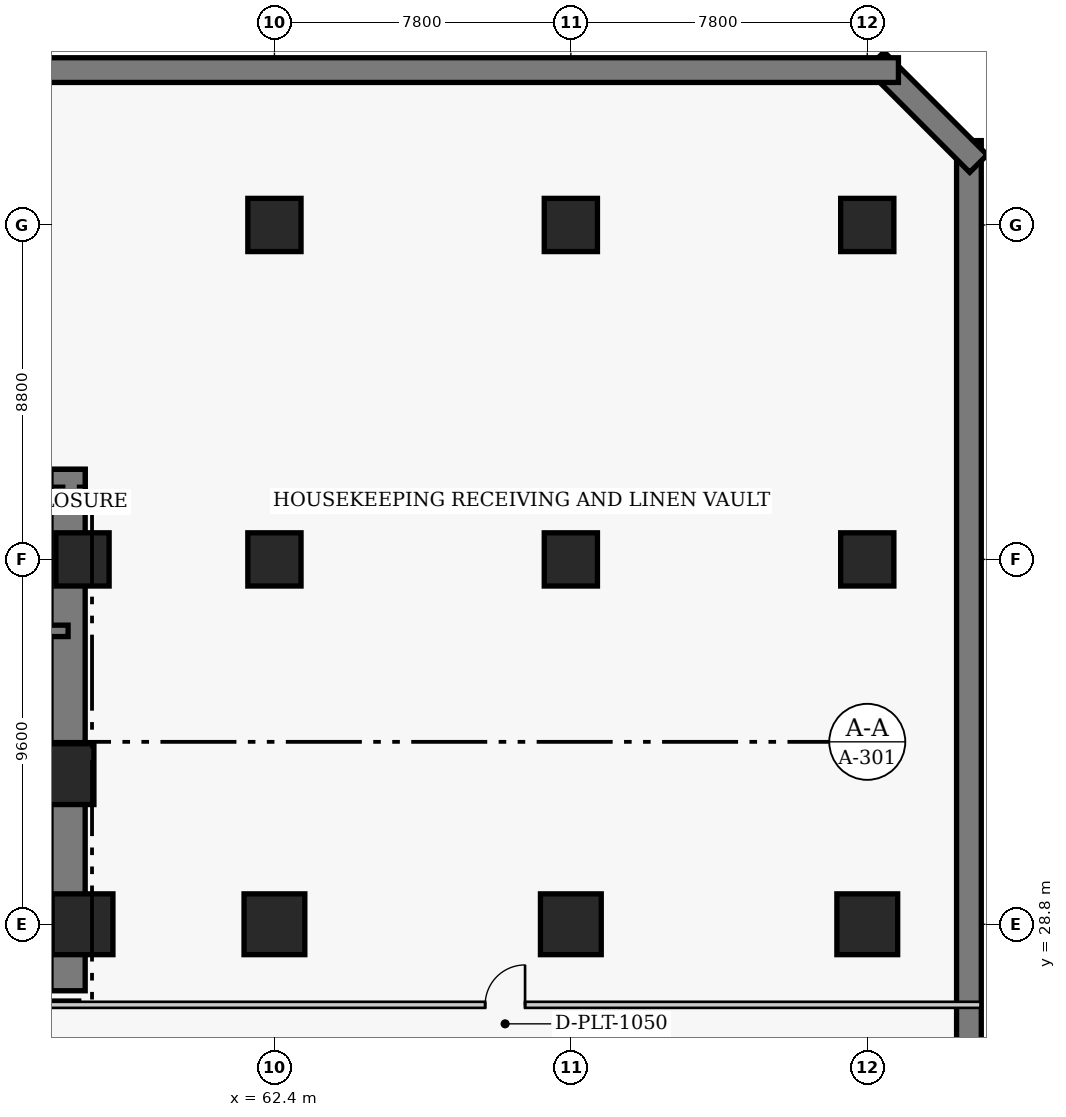
"""IFC4 building model, lengths in metres.
Left out: names, types, materials, properties, quantities, classifications, styles, units other than length and angle.
Written with IfcOpenShell. Run it as: python <this file> out.ifc"""

import sys

from ifc_helpers import new_model, si_unit, direction, frame, frame_2d, origin, origin_2d, place, context, subcontext, project, spatial, rectangle, extrude, element, fill, save


model = new_model("IFC4")
c1 = context("Model", 3, precision=1e-05, world=origin(), true_north=direction((0.0, 1.0)))
c2 = subcontext(c1, "Body", "Model", "MODEL_VIEW")
j1 = project(units=[si_unit("LENGTHUNIT", "METRE"), si_unit("PLANEANGLEUNIT", "RADIAN")], contexts=[c1])
p1 = place(None, origin())
s1 = spatial("IfcSite", under=j1, at=p1, CompositionType="ELEMENT")
p2 = place(p1, origin())
s2 = spatial("IfcBuilding", under=s1, at=p2, CompositionType="ELEMENT")
p3 = place(p2, frame((0.0, 0.0, -4.5)))
s3 = spatial("IfcBuildingStorey", under=s2, at=p3, CompositionType="ELEMENT", Elevation=-4.5)
p4 = place(p3, frame((80.675, 2.58, 0.0), z_axis=(0.0, 0.0, 1.0), x_axis=(0.0, 1.0, 0.0)))
e1 = element("IfcWall", 1, at=p4, inside=s3, PredefinedType="USERDEFINED", context=c2, shape_type="SweptSolid", body=[
    extrude(rectangle(XDim=46.84, YDim=0.65, at=frame_2d((23.42, 0.0))), origin(), (0.0, 0.0, 1.0), 4.15),
])
p5 = place(p3, frame((80.926, 48.815, 0.0), z_axis=(0.0, 0.0, 1.0), x_axis=(-0.707106781187, 0.707106781187, 0.0)))
e2 = element("IfcWall", 2, at=p5, inside=s3, PredefinedType="USERDEFINED", context=c2, shape_type="SweptSolid", body=[
    extrude(rectangle(XDim=3.834, YDim=0.65, at=frame_2d((1.917, 0.0))), origin(), (0.0, 0.0, 1.0), 4.15),
])
p6 = place(p3, frame((78.82, 51.275, 0.0), z_axis=(0.0, 0.0, 1.0), x_axis=(-1.0, 0.0, 0.0)))
e3 = element("IfcWall", 3, at=p6, inside=s3, PredefinedType="USERDEFINED", context=c2, shape_type="SweptSolid", body=[
    extrude(rectangle(XDim=79.64, YDim=0.65, at=frame_2d((39.82, 0.0))), origin(), (0.0, 0.0, 1.0), 4.15),
])
p7 = place(p3, frame((48.45, 40.32, 0.0), z_axis=(0.0, 0.0, 1.0), x_axis=(1.0, 0.0, 0.0)))
e4 = element("IfcWall", 4, at=p7, inside=s3, PredefinedType="SHEAR", context=c2, shape_type="SweptSolid", body=[
    extrude(rectangle(XDim=8.97, YDim=0.9, at=frame_2d((4.485, 0.0))), origin(), (0.0, 0.0, 1.0), 4.5),
])
p8 = place(p3, frame((56.97, 27.05, 0.0), z_axis=(0.0, 0.0, 1.0), x_axis=(0.0, 1.0, 0.0)))
e5 = element("IfcWall", 5, at=p8, inside=s3, PredefinedType="SHEAR", context=c2, shape_type="SweptSolid", body=[
    extrude(rectangle(XDim=13.72, YDim=0.9, at=frame_2d((6.86, 0.0))), origin(), (0.0, 0.0, 1.0), 4.5),
])
p9 = place(p3, frame((48.45, 36.52, 0.0), z_axis=(0.0, 0.0, 1.0), x_axis=(1.0, 0.0, 0.0)))
e6 = element("IfcWall", 6, at=p9, inside=s3, PredefinedType="SHEAR", context=c2, shape_type="SweptSolid", body=[
    extrude(rectangle(XDim=8.52, YDim=0.3, at=frame_2d((4.26, 0.0))), origin(), (0.0, 0.0, 1.0), 4.5),
])
p10 = place(p3, frame((62.4, 28.8, 0.0), z_axis=(0.0, 0.0, 1.0), x_axis=(1.0, 0.0, 0.0)))
e7 = element("IfcColumn", 7, at=p10, inside=s3, PredefinedType="COLUMN", context=c2, shape_type="SweptSolid", body=[
    extrude(rectangle(XDim=1.6, YDim=1.6, at=origin_2d()), origin(), (0.0, 0.0, 1.0), 4.5),
])
for number, where, z_axis, x_axis in (
    (8, (62.4, 38.4, 0.0), (0.0, 0.0, 1.0), (1.0, 0.0, 0.0)),
    (9, (62.4, 47.2, 0.0), (0.0, 0.0, 1.0), (1.0, 0.0, 0.0)),
):
    element("IfcColumn", number, at=place(p3, frame(where, z_axis=z_axis, x_axis=x_axis)), inside=s3, PredefinedType="COLUMN", context=c2, shape_type="SweptSolid", body=[
        extrude(rectangle(XDim=1.4, YDim=1.4, at=origin_2d()), origin(), (0.0, 0.0, 1.0), 4.5),
    ])
p11 = place(p3, frame((70.2, 28.8, 0.0), z_axis=(0.0, 0.0, 1.0), x_axis=(1.0, 0.0, 0.0)))
e10 = element("IfcColumn", 10, at=p11, inside=s3, PredefinedType="COLUMN", context=c2, shape_type="SweptSolid", body=[
    extrude(rectangle(XDim=1.6, YDim=1.6, at=origin_2d()), origin(), (0.0, 0.0, 1.0), 4.5),
])
for number, where, z_axis, x_axis in (
    (11, (70.2, 38.4, 0.0), (0.0, 0.0, 1.0), (1.0, 0.0, 0.0)),
    (12, (70.2, 47.2, 0.0), (0.0, 0.0, 1.0), (1.0, 0.0, 0.0)),
):
    element("IfcColumn", number, at=place(p3, frame(where, z_axis=z_axis, x_axis=x_axis)), inside=s3, PredefinedType="COLUMN", context=c2, shape_type="SweptSolid", body=[
        extrude(rectangle(XDim=1.4, YDim=1.4, at=origin_2d()), origin(), (0.0, 0.0, 1.0), 4.5),
    ])
p12 = place(p3, frame((78.0, 28.8, 0.0), z_axis=(0.0, 0.0, 1.0), x_axis=(1.0, 0.0, 0.0)))
e13 = element("IfcColumn", 13, at=p12, inside=s3, PredefinedType="COLUMN", context=c2, shape_type="SweptSolid", body=[
    extrude(rectangle(XDim=1.6, YDim=1.6, at=origin_2d()), origin(), (0.0, 0.0, 1.0), 4.5),
])
for number, where, z_axis, x_axis in (
    (14, (78.0, 38.4, 0.0), (0.0, 0.0, 1.0), (1.0, 0.0, 0.0)),
    (15, (78.0, 47.2, 0.0), (0.0, 0.0, 1.0), (1.0, 0.0, 0.0)),
):
    element("IfcColumn", number, at=place(p3, frame(where, z_axis=z_axis, x_axis=x_axis)), inside=s3, PredefinedType="COLUMN", context=c2, shape_type="SweptSolid", body=[
        extrude(rectangle(XDim=1.4, YDim=1.4, at=origin_2d()), origin(), (0.0, 0.0, 1.0), 4.5),
    ])
p13 = place(p3, frame((57.35, 28.8, 0.0), z_axis=(0.0, 0.0, 1.0), x_axis=(1.0, 0.0, 0.0)))
e16 = element("IfcColumn", 16, at=p13, inside=s3, PredefinedType="COLUMN", context=c2, shape_type="SweptSolid", body=[
    extrude(rectangle(XDim=1.6, YDim=1.6, at=origin_2d()), origin(), (0.0, 0.0, 1.0), 4.5),
])
p14 = place(p3, frame((57.35, 38.4, 0.0), z_axis=(0.0, 0.0, 1.0), x_axis=(1.0, 0.0, 0.0)))
e17 = element("IfcColumn", 17, at=p14, inside=s3, PredefinedType="COLUMN", context=c2, shape_type="SweptSolid", body=[
    extrude(rectangle(XDim=1.4, YDim=1.4, at=origin_2d()), origin(), (0.0, 0.0, 1.0), 4.5),
])
p15 = place(p3, frame((56.85, 32.75, 0.0), z_axis=(0.0, 0.0, 1.0), x_axis=(1.0, 0.0, 0.0)))
e18 = element("IfcColumn", 18, at=p15, inside=s3, PredefinedType="COLUMN", context=c2, shape_type="SweptSolid", body=[
    extrude(rectangle(XDim=1.6, YDim=1.6, at=origin_2d()), origin(), (0.0, 0.0, 1.0), 4.5),
])
p16 = place(p3, frame((51.12, 29.5, 0.0), z_axis=(0.0, 0.0, 1.0), x_axis=(1.0, 0.0, 0.0)))
e19 = element("IfcWall", 19, at=p16, inside=s3, PredefinedType="PARTITIONING", context=c2, shape_type="SweptSolid", body=[
    extrude(rectangle(XDim=5.63, YDim=0.16, at=frame_2d((2.815, 0.0))), origin(), (0.0, 0.0, 1.0), 4.15),
])
p17 = place(p3, frame((-2.98, 26.68, 0.0), z_axis=(0.0, 0.0, 1.0), x_axis=(1.0, 0.0, 0.0)))
e20 = element("IfcWall", 20, at=p17, inside=s3, PredefinedType="PARTITIONING", context=c2, shape_type="SweptSolid", body=[
    extrude(rectangle(XDim=83.96, YDim=0.16, at=frame_2d((41.98, 0.0))), origin(), (0.0, 0.0, 1.0), 4.15),
])
p18 = place(p17, frame((37.016, 0.0, 0.0)))
e21 = element("IfcOpeningElement", 21, at=p18, cuts=e20, PredefinedType="OPENING", context=c2, shape_type="SweptSolid", body=[
    extrude(rectangle(XDim=1.8, YDim=2.2, at=frame_2d((0.9, 1.1))), frame((0.0, 0.09, 0.0), z_axis=(0.0, -1.0, 0.0), x_axis=(1.0, 0.0, 0.0)), (0.0, 0.0, 1.0), 0.18),
])
p19 = place(p17, frame((1.2, 0.0, 0.0)))
e22 = element("IfcOpeningElement", 22, at=p19, cuts=e20, PredefinedType="OPENING", context=c2, shape_type="SweptSolid", body=[
    extrude(rectangle(XDim=1.05, YDim=2.15, at=frame_2d((0.525, 1.075))), frame((0.0, 0.09, 0.0), z_axis=(0.0, -1.0, 0.0), x_axis=(1.0, 0.0, 0.0)), (0.0, 0.0, 1.0), 0.18),
])
p20 = place(p17, frame((21.675, 0.0, 0.0)))
e23 = element("IfcOpeningElement", 23, at=p20, cuts=e20, PredefinedType="OPENING", context=c2, shape_type="SweptSolid", body=[
    extrude(rectangle(XDim=1.05, YDim=2.15, at=frame_2d((0.525, 1.075))), frame((0.0, 0.09, 0.0), z_axis=(0.0, -1.0, 0.0), x_axis=(1.0, 0.0, 0.0)), (0.0, 0.0, 1.0), 0.18),
])
p21 = place(p17, frame((70.925, 0.0, 0.0)))
e24 = element("IfcOpeningElement", 24, at=p21, cuts=e20, PredefinedType="OPENING", context=c2, shape_type="SweptSolid", body=[
    extrude(rectangle(XDim=1.05, YDim=2.15, at=frame_2d((0.525, 1.075))), frame((0.0, 0.09, 0.0), z_axis=(0.0, -1.0, 0.0), x_axis=(1.0, 0.0, 0.0)), (0.0, 0.0, 1.0), 0.18),
])
p22 = place(p21, origin())
e25 = element("IfcDoor", 25, at=p22, inside=s3, OperationType="SINGLE_SWING_RIGHT", PredefinedType="DOOR", context=c2, shape_type="SweptSolid", body=[
    extrude(rectangle(XDim=1.05, YDim=2.15, at=frame_2d((0.525, 1.075))), frame((0.0, 0.025, 0.0), z_axis=(0.0, -1.0, 0.0), x_axis=(1.0, 0.0, 0.0)), (0.0, 0.0, 1.0), 0.05),
])
fill(e24, e25)
save(model, sys.argv[1])
